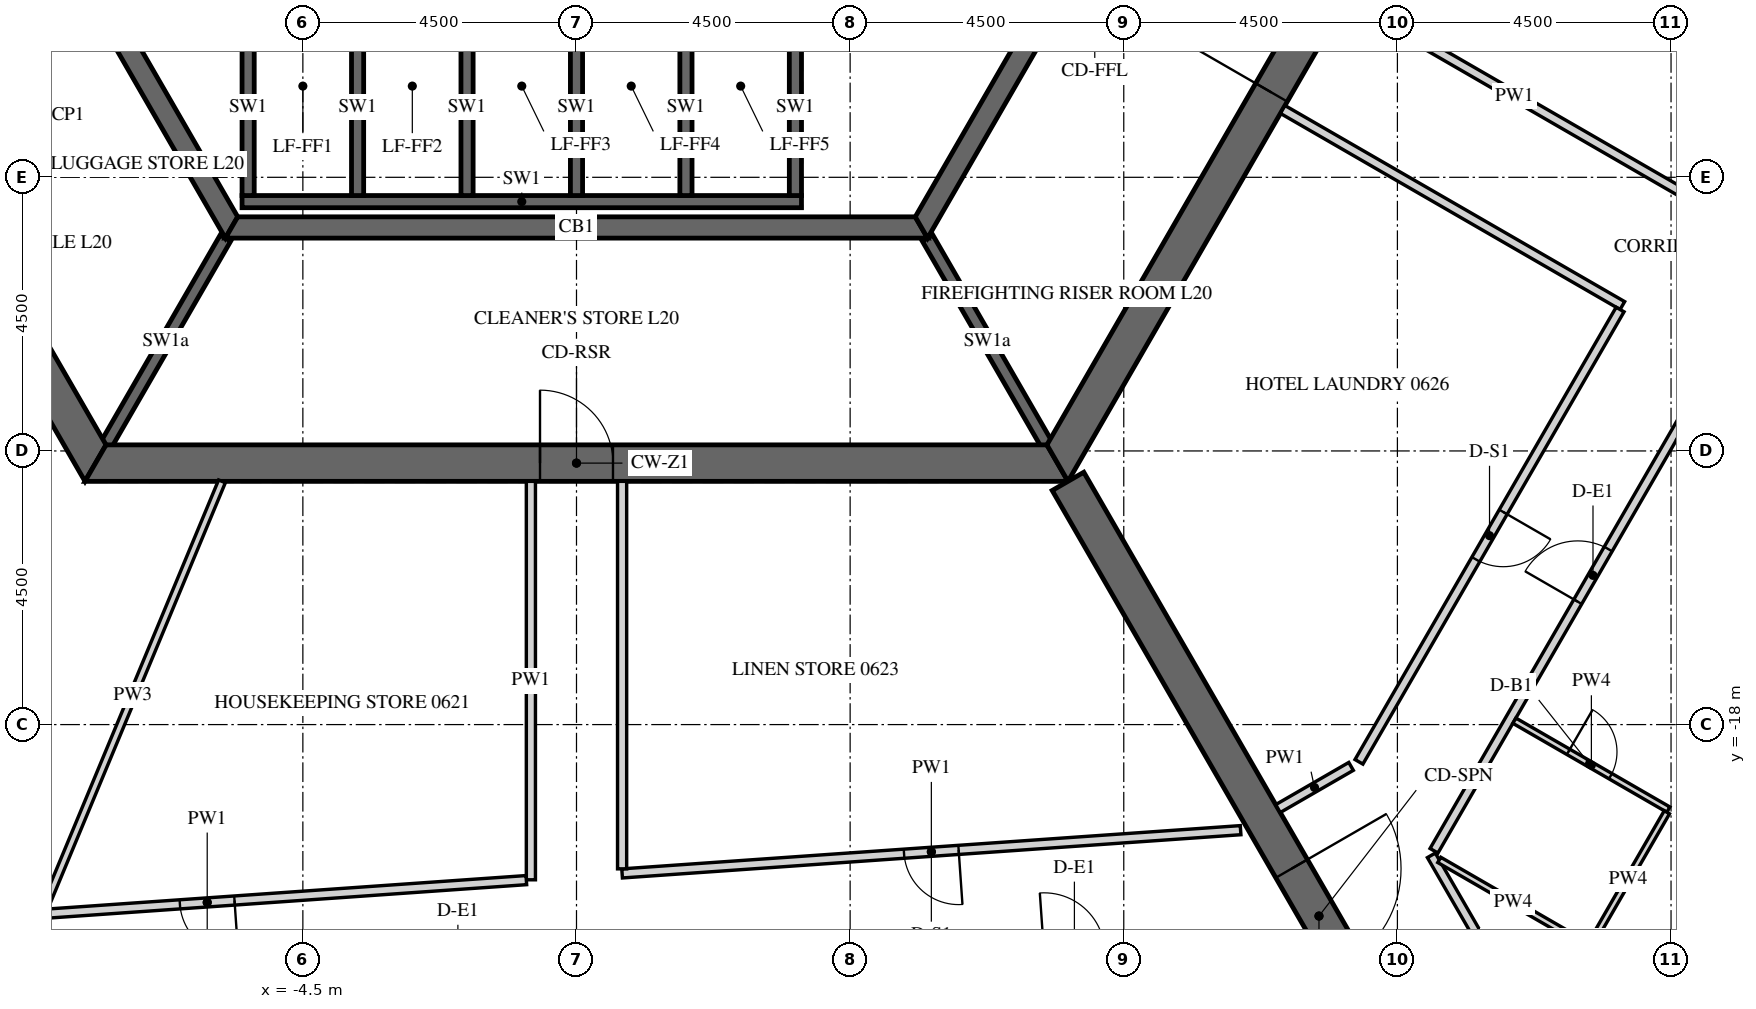
"""IFC4 building model, lengths in metres.
Left out: names, types, materials, properties, quantities, classifications, styles, units other than length and angle.
Written with IfcOpenShell. Run it as: python <this file> out.ifc"""

import sys

from ifc_helpers import new_model, si_unit, direction, frame, frame_2d, origin, place, context, subcontext, project, spatial, polyline, rectangle, outline, extrude, element, fill, save


model = new_model("IFC4")
c1 = context("Model", 3, precision=1e-05, world=origin(), true_north=direction((0.0, 1.0)))
c2 = subcontext(c1, "Body", "Model", "MODEL_VIEW")
j1 = project(units=[si_unit("LENGTHUNIT", "METRE"), si_unit("PLANEANGLEUNIT", "RADIAN")], contexts=[c1])
p1 = place(None, origin())
s1 = spatial("IfcSite", under=j1, at=p1, CompositionType="ELEMENT")
p2 = place(p1, origin())
s2 = spatial("IfcBuilding", under=s1, at=p2, CompositionType="ELEMENT")
p3 = place(p2, frame((0.0, 0.0, 92.1)))
s3 = spatial("IfcBuildingStorey", under=s2, at=p3, CompositionType="ELEMENT", Elevation=92.1)
p4 = place(p3, frame((-15.819, 0.0, -0.15), z_axis=(0.0, 0.0, 1.0), x_axis=(0.499999880136, -0.866025472988, 0.0)))
e1 = element("IfcWall", 1, at=p4, inside=s3, PredefinedType="SHEAR", context=c2, shape_type="SweptSolid", body=[
    extrude(outline(polyline([(-0.173, -0.3), (15.993, -0.3), (15.646, 0.3), (0.173, 0.3), (-0.173, -0.3)])), origin(), (0.0, 0.0, 1.0), 3.9),
])
p5 = place(p4, frame((6.981, 0.0, 0.15)))
e2 = element("IfcOpeningElement", 2, at=p5, cuts=e1, PredefinedType="OPENING", context=c2, shape_type="SweptSolid", body=[
    extrude(rectangle(XDim=1.8, YDim=2.4, at=frame_2d((0.9, 1.2))), frame((0.0, 0.31, 0.0), z_axis=(0.0, -1.0, 0.0), x_axis=(1.0, 0.0, 0.0)), (0.0, 0.0, 1.0), 0.62),
])
p6 = place(p3, frame((-7.91, -13.7, -0.15), z_axis=(0.0, 0.0, 1.0), x_axis=(1.0, 0.0, 0.0)))
e3 = element("IfcWall", 3, at=p6, inside=s3, PredefinedType="SHEAR", context=c2, shape_type="SweptSolid", body=[
    extrude(outline(polyline([(-0.173, -0.3), (15.993, -0.3), (15.646, 0.3), (0.173, 0.3), (-0.173, -0.3)])), origin(), (0.0, 0.0, 1.0), 3.9),
])
p7 = place(p6, frame((7.31, 0.0, 0.15)))
e4 = element("IfcOpeningElement", 4, at=p7, cuts=e3, PredefinedType="OPENING", context=c2, shape_type="SweptSolid", body=[
    extrude(rectangle(XDim=1.2, YDim=2.4, at=frame_2d((0.6, 1.2))), frame((0.0, 0.31, 0.0), z_axis=(0.0, -1.0, 0.0), x_axis=(1.0, 0.0, 0.0)), (0.0, 0.0, 1.0), 0.62),
])
p8 = place(p3, frame((7.91, -13.7, -0.15), z_axis=(0.0, 0.0, 1.0), x_axis=(0.499999880136, 0.866025472988, 0.0)))
e5 = element("IfcWall", 5, at=p8, inside=s3, PredefinedType="SHEAR", context=c2, shape_type="SweptSolid", body=[
    extrude(outline(polyline([(-0.173, -0.3), (15.993, -0.3), (15.646, 0.3), (0.173, 0.3), (-0.173, -0.3)])), origin(), (0.0, 0.0, 1.0), 3.9),
])
p9 = place(p8, frame((7.039, 0.0, 0.15)))
e6 = element("IfcOpeningElement", 6, at=p9, cuts=e5, PredefinedType="OPENING", context=c2, shape_type="SweptSolid", body=[
    extrude(rectangle(XDim=1.8, YDim=2.4, at=frame_2d((0.9, 1.2))), frame((0.0, 0.31, 0.0), z_axis=(0.0, -1.0, 0.0), x_axis=(1.0, 0.0, 0.0)), (0.0, 0.0, 1.0), 0.62),
])
p10 = place(p3, frame((8.083, -14.0, -0.15), z_axis=(0.0, 0.0, 1.0), x_axis=(0.499997680643, -0.866026742862, 0.0)))
e7 = element("IfcWall", 7, at=p10, inside=s3, PredefinedType="SHEAR", context=c2, shape_type="SweptSolid", body=[
    extrude(rectangle(XDim=16.509, YDim=0.6, at=frame_2d((8.254, 0.0))), origin(), (0.0, 0.0, 1.0), 3.9),
])
p11 = place(p10, frame((7.354, 0.0, 0.15)))
e8 = element("IfcOpeningElement", 8, at=p11, cuts=e7, PredefinedType="OPENING", context=c2, shape_type="SweptSolid", body=[
    extrude(rectangle(XDim=1.8, YDim=2.4, at=frame_2d((0.9, 1.2))), frame((0.0, 0.31, 0.0), z_axis=(0.0, -1.0, 0.0), x_axis=(1.0, 0.0, 0.0)), (0.0, 0.0, 1.0), 0.62),
])
p12 = place(p3, frame((-11.345, 0.0, -0.15), z_axis=(0.0, 0.0, 1.0), x_axis=(0.499995046907, -0.866028263435, 0.0)))
e9 = element("IfcWall", 9, at=p12, inside=s3, PredefinedType="SHEAR", context=c2, shape_type="SweptSolid", body=[
    extrude(outline(polyline([(-0.101, -0.175), (11.446, -0.175), (11.244, 0.175), (0.101, 0.175), (-0.101, -0.175)])), origin(), (0.0, 0.0, 1.0), 3.9),
])
p13 = place(p12, frame((4.744, 0.0, 0.15)))
e10 = element("IfcOpeningElement", 10, at=p13, cuts=e9, PredefinedType="OPENING", context=c2, shape_type="SweptSolid", body=[
    extrude(rectangle(XDim=1.8, YDim=2.4, at=frame_2d((0.9, 1.2))), frame((0.0, 0.185, 0.0), z_axis=(0.0, -1.0, 0.0), x_axis=(1.0, 0.0, 0.0)), (0.0, 0.0, 1.0), 0.37),
])
p14 = place(p3, frame((-5.673, -9.825, -0.15), z_axis=(0.0, 0.0, 1.0), x_axis=(1.0, 0.0, 0.0)))
e11 = element("IfcWall", 11, at=p14, inside=s3, PredefinedType="SHEAR", context=c2, shape_type="SweptSolid", body=[
    extrude(outline(polyline([(-0.101, -0.175), (11.446, -0.175), (11.244, 0.175), (0.101, 0.175), (-0.101, -0.175)])), origin(), (0.0, 0.0, 1.0), 3.9),
])
p15 = place(p3, frame((5.673, -9.825, -0.15), z_axis=(0.0, 0.0, 1.0), x_axis=(0.499995046907, 0.866028263435, 0.0)))
e12 = element("IfcWall", 12, at=p15, inside=s3, PredefinedType="SHEAR", context=c2, shape_type="SweptSolid", body=[
    extrude(outline(polyline([(-0.101, -0.175), (11.446, -0.175), (11.244, 0.175), (0.101, 0.175), (-0.101, -0.175)])), origin(), (0.0, 0.0, 1.0), 3.9),
])
p16 = place(p15, frame((4.801, 0.0, 0.15)))
e13 = element("IfcOpeningElement", 13, at=p16, cuts=e12, PredefinedType="OPENING", context=c2, shape_type="SweptSolid", body=[
    extrude(rectangle(XDim=1.8, YDim=2.4, at=frame_2d((0.9, 1.2))), frame((0.0, 0.185, 0.0), z_axis=(0.0, -1.0, 0.0), x_axis=(1.0, 0.0, 0.0)), (0.0, 0.0, 1.0), 0.37),
])
p17 = place(p3, frame((-5.5, -9.4, -0.25), z_axis=(0.0, 0.0, 1.0), x_axis=(1.0, 0.0, 0.0)))
e14 = element("IfcWall", 14, at=p17, inside=s3, PredefinedType="SHEAR", context=c2, shape_type="SweptSolid", body=[
    extrude(rectangle(XDim=9.2, YDim=0.2, at=frame_2d((4.6, 0.0))), origin(), (0.0, 0.0, 1.0), 3.9),
])
for number, where, z_axis, x_axis in (
    (15, (-5.4, -9.3, -0.25), (0.0, 0.0, 1.0), (0.0, 1.0, 0.0)),
    (16, (-3.6, -9.3, -0.25), (0.0, 0.0, 1.0), (0.0, 1.0, 0.0)),
    (17, (-1.8, -9.3, -0.25), (0.0, 0.0, 1.0), (0.0, 1.0, 0.0)),
    (18, (0.0, -9.3, -0.25), (0.0, 0.0, 1.0), (0.0, 1.0, 0.0)),
    (19, (1.8, -9.3, -0.25), (0.0, 0.0, 1.0), (0.0, 1.0, 0.0)),
    (20, (3.6, -9.3, -0.25), (0.0, 0.0, 1.0), (0.0, 1.0, 0.0)),
):
    element("IfcWall", number, at=place(p3, frame(where, z_axis=z_axis, x_axis=x_axis)), inside=s3, PredefinedType="SHEAR", context=c2, shape_type="SweptSolid", body=[
        extrude(rectangle(XDim=2.9, YDim=0.2, at=frame_2d((1.45, 0.0))), origin(), (0.0, 0.0, 1.0), 3.9),
    ])
for number, where, z_axis, x_axis in (
    (21, (-5.773, -10.0, -0.15), (0.0, 0.0, 1.0), (-0.5, -0.866, 0.0)),
    (22, (5.773, -10.0, -0.15), (0.0, 0.0, 1.0), (0.5, -0.866, 0.0)),
):
    element("IfcWall", number, at=place(p3, frame(where, z_axis=z_axis, x_axis=x_axis)), inside=s3, PredefinedType="SHEAR", context=c2, shape_type="SweptSolid", body=[
        extrude(rectangle(XDim=3.926, YDim=0.2, at=frame_2d((1.963, 0.0))), origin(), (0.0, 0.0, 1.0), 3.9),
    ])
p18 = place(p3, frame((-8.175, -5.841, 0.0), z_axis=(0.0, 0.0, 1.0), x_axis=(-0.866020560687, -0.500008388397, 0.0)))
e23 = element("IfcWall", 23, at=p18, inside=s3, PredefinedType="PARTITIONING", context=c2, shape_type="SweptSolid", body=[
    extrude(rectangle(XDim=3.4, YDim=0.2, at=frame_2d((1.7, 0.0))), origin(), (0.0, 0.0, 1.0), 3.65),
])
p19 = place(p18, frame((1.35, 0.0, 0.0)))
e24 = element("IfcOpeningElement", 24, at=p19, cuts=e23, PredefinedType="OPENING", context=c2, shape_type="SweptSolid", body=[
    extrude(rectangle(XDim=0.9, YDim=2.1, at=frame_2d((0.45, 1.05))), frame((0.0, 0.11, 0.0), z_axis=(0.0, -1.0, 0.0), x_axis=(1.0, 0.0, 0.0)), (0.0, 0.0, 1.0), 0.22),
])
p20 = place(p3, frame((-0.75, -14.0, 0.0), z_axis=(0.0, 0.0, 1.0), x_axis=(0.0, -1.0, 0.0)))
e25 = element("IfcWall", 25, at=p20, inside=s3, PredefinedType="PARTITIONING", context=c2, shape_type="SweptSolid", body=[
    extrude(rectangle(XDim=6.552, YDim=0.15, at=frame_2d((3.276, 0.0))), origin(), (0.0, 0.0, 1.0), 2.988),
])
p21 = place(p3, frame((-0.825, -20.558, 0.0), z_axis=(0.0, 0.0, 1.0), x_axis=(-0.997564524135, -0.069749696677, 0.0)))
e26 = element("IfcWall", 26, at=p21, inside=s3, PredefinedType="PARTITIONING", context=c2, shape_type="SweptSolid", body=[
    extrude(rectangle(XDim=10.522, YDim=0.15, at=frame_2d((5.261, 0.0))), origin(), (0.0, 0.0, 1.0), 2.988),
])
p22 = place(p21, frame((4.811, 0.0, 0.0)))
e27 = element("IfcOpeningElement", 27, at=p22, cuts=e26, PredefinedType="OPENING", context=c2, shape_type="SweptSolid", body=[
    extrude(rectangle(XDim=0.9, YDim=2.1, at=frame_2d((0.45, 1.05))), frame((0.0, 0.085, 0.0), z_axis=(0.0, -1.0, 0.0), x_axis=(1.0, 0.0, 0.0)), (0.0, 0.0, 1.0), 0.17),
])
p23 = place(p3, frame((10.921, -19.736, 0.0), z_axis=(0.0, 0.0, 1.0), x_axis=(-0.997564418338, -0.069751209779, 0.0)))
e28 = element("IfcWall", 28, at=p23, inside=s3, PredefinedType="PARTITIONING", context=c2, shape_type="SweptSolid", body=[
    extrude(rectangle(XDim=10.196, YDim=0.15, at=frame_2d((5.098, 0.0))), origin(), (0.0, 0.0, 1.0), 2.988),
])
p24 = place(p23, frame((4.648, 0.0, 0.0)))
e29 = element("IfcOpeningElement", 29, at=p24, cuts=e28, PredefinedType="OPENING", context=c2, shape_type="SweptSolid", body=[
    extrude(rectangle(XDim=0.9, YDim=2.1, at=frame_2d((0.45, 1.05))), frame((0.0, 0.085, 0.0), z_axis=(0.0, -1.0, 0.0), x_axis=(1.0, 0.0, 0.0)), (0.0, 0.0, 1.0), 0.17),
])
p25 = place(p3, frame((0.75, -20.372, 0.0), z_axis=(0.0, 0.0, 1.0), x_axis=(0.0, 1.0, 0.0)))
e30 = element("IfcWall", 30, at=p25, inside=s3, PredefinedType="PARTITIONING", context=c2, shape_type="SweptSolid", body=[
    extrude(rectangle(XDim=6.372, YDim=0.15, at=frame_2d((3.186, 0.0))), origin(), (0.0, 0.0, 1.0), 2.988),
])
p26 = place(p3, frame((15.441, -22.545, 0.0), z_axis=(0.0, 0.0, 1.0), x_axis=(-0.499974611044, 0.866040061609, 0.0)))
e31 = element("IfcWall", 31, at=p26, inside=s3, PredefinedType="PARTITIONING", context=c2, shape_type="SweptSolid", body=[
    extrude(rectangle(XDim=2.766, YDim=0.15, at=frame_2d((1.383, 0.0))), origin(), (0.0, 0.0, 1.0), 2.988),
])
p27 = place(p3, frame((14.102, -20.075, 0.0), z_axis=(0.0, 0.0, 1.0), x_axis=(0.499996816197, 0.866027241946, 0.0)))
e32 = element("IfcWall", 32, at=p27, inside=s3, PredefinedType="PARTITIONING", context=c2, shape_type="SweptSolid", body=[
    extrude(rectangle(XDim=24.238, YDim=0.15, at=frame_2d((12.119, 0.0))), origin(), (0.0, 0.0, 1.0), 2.988),
])
p28 = place(p27, frame((4.729, 0.0, 0.0)))
e33 = element("IfcOpeningElement", 33, at=p28, cuts=e32, PredefinedType="OPENING", context=c2, shape_type="SweptSolid", body=[
    extrude(rectangle(XDim=1.0, YDim=2.1, at=frame_2d((0.5, 1.05))), frame((0.0, 0.085, 0.0), z_axis=(0.0, -1.0, 0.0), x_axis=(1.0, 0.0, 0.0)), (0.0, 0.0, 1.0), 0.17),
])
p29 = place(p27, frame((13.446, 0.0, 0.0)))
e34 = element("IfcOpeningElement", 34, at=p29, cuts=e32, PredefinedType="OPENING", context=c2, shape_type="SweptSolid", body=[
    extrude(rectangle(XDim=1.0, YDim=2.1, at=frame_2d((0.5, 1.05))), frame((0.0, 0.085, 0.0), z_axis=(0.0, -1.0, 0.0), x_axis=(1.0, 0.0, 0.0)), (0.0, 0.0, 1.0), 0.17),
])
p30 = place(p3, frame((18.185, -9.253, 0.0), z_axis=(0.0, 0.0, 1.0), x_axis=(-0.866028703517, 0.499994284652, 0.0)))
e35 = element("IfcWall", 35, at=p30, inside=s3, PredefinedType="PARTITIONING", context=c2, shape_type="SweptSolid", body=[
    extrude(rectangle(XDim=6.375, YDim=0.15, at=frame_2d((3.188, 0.0))), origin(), (0.0, 0.0, 1.0), 2.988),
])
p31 = place(p3, frame((11.614, -7.884, 0.0), z_axis=(0.0, 0.0, 1.0), x_axis=(0.866021702275, -0.500006411147, 0.0)))
e36 = element("IfcWall", 36, at=p31, inside=s3, PredefinedType="PARTITIONING", context=c2, shape_type="SweptSolid", body=[
    extrude(rectangle(XDim=6.45, YDim=0.15, at=frame_2d((3.225, 0.0))), origin(), (0.0, 0.0, 1.0), 2.988),
])
p32 = place(p3, frame((17.162, -11.174, 0.0), z_axis=(0.0, 0.0, 1.0), x_axis=(-0.499997214665, -0.866027011893, 0.0)))
e37 = element("IfcWall", 37, at=p32, inside=s3, PredefinedType="PARTITIONING", context=c2, shape_type="SweptSolid", body=[
    extrude(rectangle(XDim=8.589, YDim=0.15, at=frame_2d((4.294, 0.0))), origin(), (0.0, 0.0, 1.0), 2.988),
])
p33 = place(p32, frame((3.844, 0.0, 0.0)))
e38 = element("IfcOpeningElement", 38, at=p33, cuts=e37, PredefinedType="OPENING", context=c2, shape_type="SweptSolid", body=[
    extrude(rectangle(XDim=0.9, YDim=2.1, at=frame_2d((0.45, 1.05))), frame((0.0, 0.085, 0.0), z_axis=(0.0, -1.0, 0.0), x_axis=(1.0, 0.0, 0.0)), (0.0, 0.0, 1.0), 0.17),
])
p34 = place(p3, frame((12.738, -18.688, 0.0), z_axis=(0.0, 0.0, 1.0), x_axis=(-0.866080107329, -0.499905238708, 0.0)))
e39 = element("IfcWall", 39, at=p34, inside=s3, PredefinedType="PARTITIONING", context=c2, shape_type="SweptSolid", body=[
    extrude(rectangle(XDim=1.387, YDim=0.15, at=frame_2d((0.694, 0.0))), origin(), (0.0, 0.0, 1.0), 2.988),
])
p35 = place(p3, frame((15.423, -17.936, 0.0), z_axis=(0.0, 0.0, 1.0), x_axis=(0.86601045545, -0.500025890382, 0.0)))
e40 = element("IfcWall", 40, at=p35, inside=s3, PredefinedType="PARTITIONING", context=c2, shape_type="SweptSolid", body=[
    extrude(rectangle(XDim=2.925, YDim=0.1, at=frame_2d((1.462, 0.0))), origin(), (0.0, 0.0, 1.0), 2.988),
])
p36 = place(p35, frame((1.025, 0.0, 0.0)))
e41 = element("IfcOpeningElement", 41, at=p36, cuts=e40, PredefinedType="OPENING", context=c2, shape_type="SweptSolid", body=[
    extrude(rectangle(XDim=0.8, YDim=2.1, at=frame_2d((0.4, 1.05))), frame((0.0, 0.06, 0.0), z_axis=(0.0, -1.0, 0.0), x_axis=(1.0, 0.0, 0.0)), (0.0, 0.0, 1.0), 0.12),
])
p37 = place(p3, frame((17.932, -19.442, 0.0), z_axis=(0.0, 0.0, 1.0), x_axis=(-0.500062241894, -0.865989465428, 0.0)))
e42 = element("IfcWall", 42, at=p37, inside=s3, PredefinedType="PARTITIONING", context=c2, shape_type="SweptSolid", body=[
    extrude(rectangle(XDim=2.55, YDim=0.1, at=frame_2d((1.275, 0.0))), origin(), (0.0, 0.0, 1.0), 2.988),
])
p38 = place(p3, frame((16.613, -21.625, 0.0), z_axis=(0.0, 0.0, 1.0), x_axis=(-0.866034573852, 0.49998411664, 0.0)))
e43 = element("IfcWall", 43, at=p38, inside=s3, PredefinedType="PARTITIONING", context=c2, shape_type="SweptSolid", body=[
    extrude(rectangle(XDim=2.8, YDim=0.1, at=frame_2d((1.4, 0.0))), origin(), (0.0, 0.0, 1.0), 2.988),
])
p39 = place(p3, frame((24.31, -16.794, 0.0), z_axis=(0.0, 0.0, 1.0), x_axis=(-0.866024672353, 0.500001266874, 0.0)))
e44 = element("IfcWall", 44, at=p39, inside=s3, PredefinedType="PARTITIONING", context=c2, shape_type="SweptSolid", body=[
    extrude(rectangle(XDim=7.125, YDim=0.18, at=frame_2d((3.562, 0.0))), origin(), (0.0, 0.0, 1.0), 2.988),
])
p40 = place(p3, frame((-5.83, -14.0, 0.0), z_axis=(0.0, 0.0, 1.0), x_axis=(-0.384440276883, -0.923149865141, 0.0)))
e45 = element("IfcWall", 45, at=p40, inside=s3, PredefinedType="PARTITIONING", context=c2, shape_type="SweptSolid", body=[
    extrude(rectangle(XDim=7.623, YDim=0.12, at=frame_2d((3.812, 0.0))), origin(), (0.0, 0.0, 1.0), 2.988),
])
p41 = place(p9, origin())
e46 = element("IfcDoor", 46, at=p41, inside=s3, OperationType="DOUBLE_DOOR_SINGLE_SWING", PredefinedType="DOOR", context=c2, shape_type="SweptSolid", body=[
    extrude(rectangle(XDim=1.8, YDim=2.4, at=frame_2d((0.9, 1.2))), frame((0.0, 0.025, 0.0), z_axis=(0.0, -1.0, 0.0), x_axis=(1.0, 0.0, 0.0)), (0.0, 0.0, 1.0), 0.05),
])
fill(e6, e46)
p42 = place(p7, origin())
e47 = element("IfcDoor", 47, at=p42, inside=s3, OperationType="SINGLE_SWING_LEFT", PredefinedType="DOOR", context=c2, shape_type="SweptSolid", body=[
    extrude(rectangle(XDim=1.2, YDim=2.4, at=frame_2d((0.6, 1.2))), frame((0.0, 0.025, 0.0), z_axis=(0.0, -1.0, 0.0), x_axis=(1.0, 0.0, 0.0)), (0.0, 0.0, 1.0), 0.05),
])
fill(e4, e47)
p43 = place(p11, origin())
e48 = element("IfcDoor", 48, at=p43, inside=s3, OperationType="DOUBLE_DOOR_SINGLE_SWING", PredefinedType="DOOR", context=c2, shape_type="SweptSolid", body=[
    extrude(rectangle(XDim=1.8, YDim=2.4, at=frame_2d((0.9, 1.2))), frame((0.0, 0.025, 0.0), z_axis=(0.0, -1.0, 0.0), x_axis=(1.0, 0.0, 0.0)), (0.0, 0.0, 1.0), 0.05),
])
fill(e8, e48)
p44 = place(p28, origin())
e49 = element("IfcDoor", 49, at=p44, inside=s3, OperationType="SINGLE_SWING_LEFT", PredefinedType="DOOR", context=c2, shape_type="SweptSolid", body=[
    extrude(rectangle(XDim=1.0, YDim=2.1, at=frame_2d((0.5, 1.05))), frame((0.0, 0.025, 0.0), z_axis=(0.0, -1.0, 0.0), x_axis=(1.0, 0.0, 0.0)), (0.0, 0.0, 1.0), 0.05),
])
fill(e33, e49)
p45 = place(p36, origin())
e50 = element("IfcDoor", 50, at=p45, inside=s3, OperationType="SINGLE_SWING_RIGHT", PredefinedType="DOOR", context=c2, shape_type="SweptSolid", body=[
    extrude(rectangle(XDim=0.8, YDim=2.1, at=frame_2d((0.4, 1.05))), frame((0.0, 0.025, 0.0), z_axis=(0.0, -1.0, 0.0), x_axis=(1.0, 0.0, 0.0)), (0.0, 0.0, 1.0), 0.05),
])
fill(e41, e50)
p46 = place(p22, origin())
e51 = element("IfcDoor", 51, at=p46, inside=s3, OperationType="SINGLE_SWING_LEFT", PredefinedType="DOOR", context=c2, shape_type="SweptSolid", body=[
    extrude(rectangle(XDim=0.9, YDim=2.1, at=frame_2d((0.45, 1.05))), frame((0.0, 0.025, 0.0), z_axis=(0.0, -1.0, 0.0), x_axis=(1.0, 0.0, 0.0)), (0.0, 0.0, 1.0), 0.05),
])
fill(e27, e51)
p47 = place(p24, origin())
e52 = element("IfcDoor", 52, at=p47, inside=s3, OperationType="SINGLE_SWING_LEFT", PredefinedType="DOOR", context=c2, shape_type="SweptSolid", body=[
    extrude(rectangle(XDim=0.9, YDim=2.1, at=frame_2d((0.45, 1.05))), frame((0.0, 0.025, 0.0), z_axis=(0.0, -1.0, 0.0), x_axis=(1.0, 0.0, 0.0)), (0.0, 0.0, 1.0), 0.05),
])
fill(e29, e52)
p48 = place(p33, origin())
e53 = element("IfcDoor", 53, at=p48, inside=s3, OperationType="SINGLE_SWING_LEFT", PredefinedType="DOOR", context=c2, shape_type="SweptSolid", body=[
    extrude(rectangle(XDim=0.9, YDim=2.1, at=frame_2d((0.45, 1.05))), frame((0.0, 0.025, 0.0), z_axis=(0.0, -1.0, 0.0), x_axis=(1.0, 0.0, 0.0)), (0.0, 0.0, 1.0), 0.05),
])
fill(e38, e53)
save(model, sys.argv[1])
